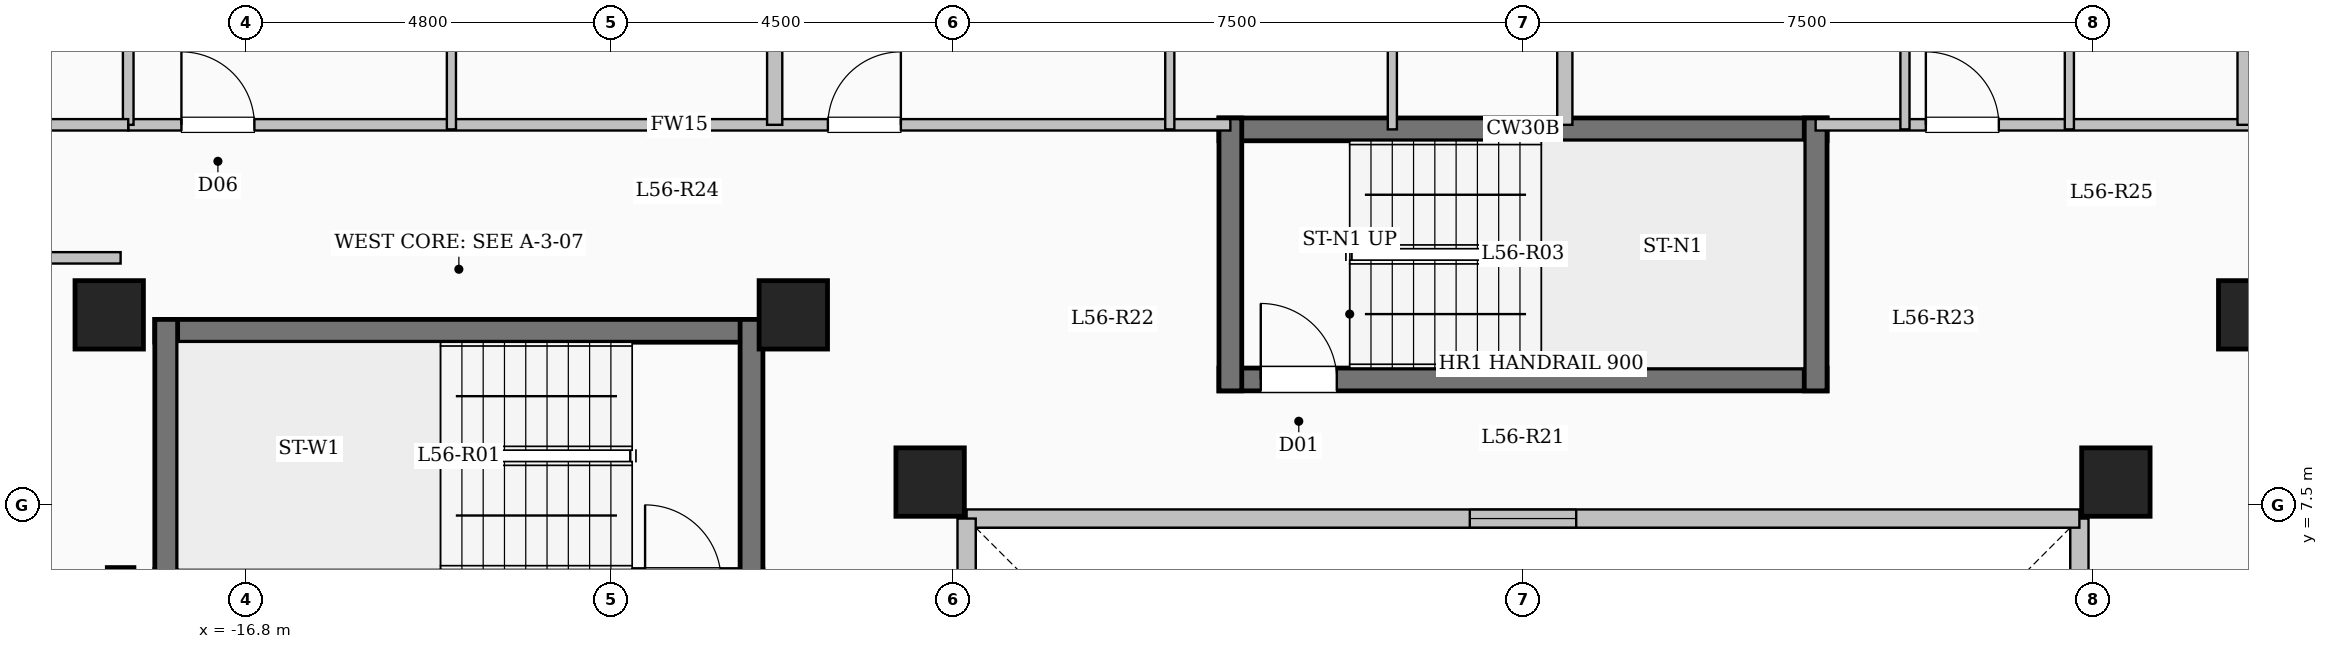
"""IFC4 building model, lengths in metres.
Left out: names, types, materials, properties, quantities, classifications, styles, units other than length and angle.
Written with IfcOpenShell. Run it as: python <this file> out.ifc"""

import sys

from ifc_helpers import new_model, si_unit, direction, frame, frame_2d, origin, origin_2d, place, context, subcontext, project, spatial, rectangle, extrude, element, fill, save


model = new_model("IFC4")
c1 = context("Model", 3, precision=1e-05, world=origin(), true_north=direction((0.0, 1.0)))
c2 = subcontext(c1, "Body", "Model", "MODEL_VIEW")
j1 = project(units=[si_unit("LENGTHUNIT", "METRE"), si_unit("PLANEANGLEUNIT", "RADIAN")], contexts=[c1])
p1 = place(None, origin())
s1 = spatial("IfcSite", under=j1, at=p1, CompositionType="ELEMENT")
p2 = place(p1, origin())
s2 = spatial("IfcBuilding", under=s1, at=p2, CompositionType="ELEMENT")
p3 = place(p2, frame((0.0, 0.0, 207.0)))
s3 = spatial("IfcBuildingStorey", under=s2, at=p3, CompositionType="ELEMENT", Elevation=207.0)
for number, where, z_axis, x_axis in (
    (1, (-7.8, 7.8, 0.0), (0.0, 0.0, 1.0), (1.0, 0.0, 0.0)),
    (2, (7.8, 7.8, 0.0), (0.0, 0.0, 1.0), (1.0, 0.0, 0.0)),
    (3, (-9.6, 10.0, 0.0), (0.0, 0.0, 1.0), (1.0, 0.0, 0.0)),
    (4, (9.6, 10.0, 0.0), (0.0, 0.0, 1.0), (1.0, 0.0, 0.0)),
    (5, (-18.6, 10.0, 0.0), (0.0, 0.0, 1.0), (1.0, 0.0, 0.0)),
):
    element("IfcColumn", number, at=place(p3, frame(where, z_axis=z_axis, x_axis=x_axis)), inside=s3, PredefinedType="COLUMN", context=c2, shape_type="SweptSolid", body=[
        extrude(rectangle(XDim=0.9, YDim=0.9, at=origin_2d()), origin(), (0.0, 0.0, 1.0), 3.35),
    ])
p4 = place(p3, frame((7.32, -7.32, 0.0), z_axis=(0.0, 0.0, 1.0), x_axis=(0.0, 1.0, 0.0)))
e6 = element("IfcWall", 6, at=p4, inside=s3, PredefinedType="SOLIDWALL", context=c2, shape_type="SweptSolid", body=[
    extrude(rectangle(XDim=14.64, YDim=0.24, at=frame_2d((7.32, 0.0))), origin(), (0.0, 0.0, 1.0), 3.1),
])
p5 = place(p4, frame((6.62, 0.0, 0.95)))
e7 = element("IfcOpeningElement", 7, at=p5, cuts=e6, PredefinedType="OPENING", context=c2, shape_type="SweptSolid", body=[
    extrude(rectangle(XDim=1.4, YDim=1.5, at=frame_2d((0.7, 0.75))), frame((0.0, 0.13, 0.0), z_axis=(0.0, -1.0, 0.0), x_axis=(1.0, 0.0, 0.0)), (0.0, 0.0, 1.0), 0.26),
])
p6 = place(p3, frame((7.32, 7.32, 0.0), z_axis=(0.0, 0.0, 1.0), x_axis=(-1.0, 0.0, 0.0)))
e8 = element("IfcWall", 8, at=p6, inside=s3, PredefinedType="SOLIDWALL", context=c2, shape_type="SweptSolid", body=[
    extrude(rectangle(XDim=14.64, YDim=0.24, at=frame_2d((7.32, 0.0))), origin(), (0.0, 0.0, 1.0), 3.1),
])
p7 = place(p6, frame((6.62, 0.0, 0.95)))
e9 = element("IfcOpeningElement", 9, at=p7, cuts=e8, PredefinedType="OPENING", context=c2, shape_type="SweptSolid", body=[
    extrude(rectangle(XDim=1.4, YDim=1.5, at=frame_2d((0.7, 0.75))), frame((0.0, 0.13, 0.0), z_axis=(0.0, -1.0, 0.0), x_axis=(1.0, 0.0, 0.0)), (0.0, 0.0, 1.0), 0.26),
])
p8 = place(p3, frame((-7.32, 7.32, 0.0), z_axis=(0.0, 0.0, 1.0), x_axis=(0.0, -1.0, 0.0)))
e10 = element("IfcWall", 10, at=p8, inside=s3, PredefinedType="SOLIDWALL", context=c2, shape_type="SweptSolid", body=[
    extrude(rectangle(XDim=14.64, YDim=0.24, at=frame_2d((7.32, 0.0))), origin(), (0.0, 0.0, 1.0), 3.1),
])
p9 = place(p8, frame((6.62, 0.0, 0.95)))
e11 = element("IfcOpeningElement", 11, at=p9, cuts=e10, PredefinedType="OPENING", context=c2, shape_type="SweptSolid", body=[
    extrude(rectangle(XDim=1.4, YDim=1.5, at=frame_2d((0.7, 0.75))), frame((0.0, 0.13, 0.0), z_axis=(0.0, -1.0, 0.0), x_axis=(1.0, 0.0, 0.0)), (0.0, 0.0, 1.0), 0.26),
])
p10 = place(p3, frame((-18.0, 9.79, 0.0), z_axis=(0.0, 0.0, 1.0), x_axis=(1.0, 0.0, 0.0)))
e12 = element("IfcWall", 12, at=p10, inside=s3, PredefinedType="SHEAR", context=c2, shape_type="SweptSolid", body=[
    extrude(rectangle(XDim=8.0, YDim=0.3, at=frame_2d((4.0, 0.0))), origin(), (0.0, 0.0, 1.0), 3.35),
])
p11 = place(p3, frame((-18.0, 6.5, 0.0), z_axis=(0.0, 0.0, 1.0), x_axis=(1.0, 0.0, 0.0)))
e13 = element("IfcWall", 13, at=p11, inside=s3, PredefinedType="SHEAR", context=c2, shape_type="SweptSolid", body=[
    extrude(rectangle(XDim=8.0, YDim=0.3, at=frame_2d((4.0, 0.0))), origin(), (0.0, 0.0, 1.0), 3.35),
])
p12 = place(p11, frame((6.45, 0.0, 0.0)))
e14 = element("IfcOpeningElement", 14, at=p12, cuts=e13, PredefinedType="OPENING", context=c2, shape_type="SweptSolid", body=[
    extrude(rectangle(XDim=1.0, YDim=2.15, at=frame_2d((0.5, 1.075))), frame((0.0, 0.16, 0.0), z_axis=(0.0, -1.0, 0.0), x_axis=(1.0, 0.0, 0.0)), (0.0, 0.0, 1.0), 0.32),
])
for number, where, z_axis, x_axis in (
    (15, (-17.85, 6.35, 0.0), (0.0, 0.0, 1.0), (0.0, 1.0, 0.0)),
    (16, (-10.15, 6.35, 0.0), (0.0, 0.0, 1.0), (0.0, 1.0, 0.0)),
):
    element("IfcWall", number, at=place(p3, frame(where, z_axis=z_axis, x_axis=x_axis)), inside=s3, PredefinedType="SHEAR", context=c2, shape_type="SweptSolid", body=[
        extrude(rectangle(XDim=3.59, YDim=0.3, at=frame_2d((1.795, 0.0))), origin(), (0.0, 0.0, 1.0), 3.35),
    ])
p13 = place(p3, frame((-4.0, 12.44, 0.0), z_axis=(0.0, 0.0, 1.0), x_axis=(1.0, 0.0, 0.0)))
e17 = element("IfcWall", 17, at=p13, inside=s3, PredefinedType="SHEAR", context=c2, shape_type="SweptSolid", body=[
    extrude(rectangle(XDim=8.0, YDim=0.3, at=frame_2d((4.0, 0.0))), origin(), (0.0, 0.0, 1.0), 3.35),
])
p14 = place(p3, frame((-4.0, 9.15, 0.0), z_axis=(0.0, 0.0, 1.0), x_axis=(1.0, 0.0, 0.0)))
e18 = element("IfcWall", 18, at=p14, inside=s3, PredefinedType="SHEAR", context=c2, shape_type="SweptSolid", body=[
    extrude(rectangle(XDim=8.0, YDim=0.3, at=frame_2d((4.0, 0.0))), origin(), (0.0, 0.0, 1.0), 3.35),
])
p15 = place(p14, frame((0.55, 0.0, 0.0)))
e19 = element("IfcOpeningElement", 19, at=p15, cuts=e18, PredefinedType="OPENING", context=c2, shape_type="SweptSolid", body=[
    extrude(rectangle(XDim=1.0, YDim=2.15, at=frame_2d((0.5, 1.075))), frame((0.0, 0.16, 0.0), z_axis=(0.0, -1.0, 0.0), x_axis=(1.0, 0.0, 0.0)), (0.0, 0.0, 1.0), 0.32),
])
for number, where, z_axis, x_axis in (
    (20, (-3.85, 9.0, 0.0), (0.0, 0.0, 1.0), (0.0, 1.0, 0.0)),
    (21, (3.85, 9.0, 0.0), (0.0, 0.0, 1.0), (0.0, 1.0, 0.0)),
):
    element("IfcWall", number, at=place(p3, frame(where, z_axis=z_axis, x_axis=x_axis)), inside=s3, PredefinedType="SHEAR", context=c2, shape_type="SweptSolid", body=[
        extrude(rectangle(XDim=3.59, YDim=0.3, at=frame_2d((1.795, 0.0))), origin(), (0.0, 0.0, 1.0), 3.35),
    ])
p16 = place(p3, frame((-18.45, -7.375, 0.0), z_axis=(0.0, 0.0, 1.0), x_axis=(0.0, 1.0, 0.0)))
e22 = element("IfcWall", 22, at=p16, inside=s3, PredefinedType="SHEAR", context=c2, shape_type="SweptSolid", body=[
    extrude(rectangle(XDim=14.05, YDim=0.35, at=frame_2d((7.025, 0.0))), origin(), (0.0, 0.0, 1.0), 3.35),
])
p17 = place(p3, frame((-18.35, 12.5, 0.0), z_axis=(0.0, 0.0, 1.0), x_axis=(1.0, 0.0, 0.0)))
e23 = element("IfcWall", 23, at=p17, inside=s3, PredefinedType="PARTITIONING", context=c2, shape_type="SweptSolid", body=[
    extrude(rectangle(XDim=14.5, YDim=0.15, at=frame_2d((7.25, 0.0))), origin(), (0.0, 0.0, 1.0), 3.1),
])
p18 = place(p17, frame((0.7, 0.0, 0.0)))
e24 = element("IfcOpeningElement", 24, at=p18, cuts=e23, PredefinedType="OPENING", context=c2, shape_type="SweptSolid", body=[
    extrude(rectangle(XDim=0.96, YDim=2.15, at=frame_2d((0.48, 1.075))), frame((0.0, 0.085, 0.0), z_axis=(0.0, -1.0, 0.0), x_axis=(1.0, 0.0, 0.0)), (0.0, 0.0, 1.0), 0.17),
])
p19 = place(p17, frame((9.205, 0.0, 0.0)))
e25 = element("IfcOpeningElement", 25, at=p19, cuts=e23, PredefinedType="OPENING", context=c2, shape_type="SweptSolid", body=[
    extrude(rectangle(XDim=0.96, YDim=2.15, at=frame_2d((0.48, 1.075))), frame((0.0, 0.085, 0.0), z_axis=(0.0, -1.0, 0.0), x_axis=(1.0, 0.0, 0.0)), (0.0, 0.0, 1.0), 0.17),
])
p20 = place(p3, frame((3.85, 12.5, 0.0), z_axis=(0.0, 0.0, 1.0), x_axis=(1.0, 0.0, 0.0)))
e26 = element("IfcWall", 26, at=p20, inside=s3, PredefinedType="PARTITIONING", context=c2, shape_type="SweptSolid", body=[
    extrude(rectangle(XDim=14.5, YDim=0.15, at=frame_2d((7.25, 0.0))), origin(), (0.0, 0.0, 1.0), 3.1),
])
p21 = place(p20, frame((1.45, 0.0, 0.0)))
e27 = element("IfcOpeningElement", 27, at=p21, cuts=e26, PredefinedType="OPENING", context=c2, shape_type="SweptSolid", body=[
    extrude(rectangle(XDim=0.96, YDim=2.15, at=frame_2d((0.48, 1.075))), frame((0.0, 0.085, 0.0), z_axis=(0.0, -1.0, 0.0), x_axis=(1.0, 0.0, 0.0)), (0.0, 0.0, 1.0), 0.17),
])
p22 = place(p20, frame((6.35, 0.0, 0.0)))
e28 = element("IfcOpeningElement", 28, at=p22, cuts=e26, PredefinedType="OPENING", context=c2, shape_type="SweptSolid", body=[
    extrude(rectangle(XDim=0.96, YDim=2.15, at=frame_2d((0.48, 1.075))), frame((0.0, 0.085, 0.0), z_axis=(0.0, -1.0, 0.0), x_axis=(1.0, 0.0, 0.0)), (0.0, 0.0, 1.0), 0.17),
])
p23 = place(p3, frame((0.55, 12.5, 0.0), z_axis=(0.0, 0.0, 1.0), x_axis=(0.0, 1.0, 0.0)))
e29 = element("IfcWall", 29, at=p23, inside=s3, PredefinedType="SOLIDWALL", context=c2, shape_type="SweptSolid", body=[
    extrude(rectangle(XDim=9.88, YDim=0.2, at=frame_2d((4.94, 0.0))), origin(), (0.0, 0.0, 1.0), 3.1),
])
p24 = place(p3, frame((-9.845, 12.5, 0.0), z_axis=(0.0, 0.0, 1.0), x_axis=(0.0, 1.0, 0.0)))
e30 = element("IfcWall", 30, at=p24, inside=s3, PredefinedType="SOLIDWALL", context=c2, shape_type="SweptSolid", body=[
    extrude(rectangle(XDim=8.685, YDim=0.2, at=frame_2d((4.343, 0.0))), origin(), (0.0, 0.0, 1.0), 3.1),
])
p25 = place(p3, frame((-14.098, 12.44, 0.0), z_axis=(0.0, 0.0, 1.0), x_axis=(0.0, 1.0, 0.0)))
e31 = element("IfcWall", 31, at=p25, inside=s3, PredefinedType="PARTITIONING", context=c2, shape_type="SweptSolid", body=[
    extrude(rectangle(XDim=3.21, YDim=0.12, at=frame_2d((1.605, 0.0))), origin(), (0.0, 0.0, 1.0), 3.1),
])
p26 = place(p25, frame((1.195, 0.0, 0.0)))
e32 = element("IfcOpeningElement", 32, at=p26, cuts=e31, PredefinedType="OPENING", context=c2, shape_type="SweptSolid", body=[
    extrude(rectangle(XDim=0.88, YDim=2.1, at=frame_2d((0.44, 1.05))), frame((0.0, 0.07, 0.0), z_axis=(0.0, -1.0, 0.0), x_axis=(1.0, 0.0, 0.0)), (0.0, 0.0, 1.0), 0.14),
])
p27 = place(p3, frame((-4.647, 12.44, 0.0), z_axis=(0.0, 0.0, 1.0), x_axis=(0.0, 1.0, 0.0)))
e33 = element("IfcWall", 33, at=p27, inside=s3, PredefinedType="PARTITIONING", context=c2, shape_type="SweptSolid", body=[
    extrude(rectangle(XDim=9.94, YDim=0.12, at=frame_2d((4.97, 0.0))), origin(), (0.0, 0.0, 1.0), 3.1),
])
p28 = place(p27, frame((3.075, 0.0, 0.0)))
e34 = element("IfcOpeningElement", 34, at=p28, cuts=e33, PredefinedType="OPENING", context=c2, shape_type="SweptSolid", body=[
    extrude(rectangle(XDim=1.08, YDim=2.15, at=frame_2d((0.54, 1.075))), frame((0.0, 0.07, 0.0), z_axis=(0.0, -1.0, 0.0), x_axis=(1.0, 0.0, 0.0)), (0.0, 0.0, 1.0), 0.14),
])
p29 = place(p3, frame((-1.719, 12.44, 0.0), z_axis=(0.0, 0.0, 1.0), x_axis=(0.0, 1.0, 0.0)))
e35 = element("IfcWall", 35, at=p29, inside=s3, PredefinedType="PARTITIONING", context=c2, shape_type="SweptSolid", body=[
    extrude(rectangle(XDim=2.79, YDim=0.12, at=frame_2d((1.395, 0.0))), origin(), (0.0, 0.0, 1.0), 3.1),
])
p30 = place(p3, frame((9.5, 12.5, 0.0), z_axis=(0.0, 0.0, 1.0), x_axis=(0.0, 1.0, 0.0)))
e36 = element("IfcWall", 36, at=p30, inside=s3, PredefinedType="SOLIDWALL", context=c2, shape_type="SweptSolid", body=[
    extrude(rectangle(XDim=8.77, YDim=0.2, at=frame_2d((4.385, 0.0))), origin(), (0.0, 0.0, 1.0), 3.1),
])
p31 = place(p3, frame((5.025, 12.44, 0.0), z_axis=(0.0, 0.0, 1.0), x_axis=(0.0, 1.0, 0.0)))
e37 = element("IfcWall", 37, at=p31, inside=s3, PredefinedType="PARTITIONING", context=c2, shape_type="SweptSolid", body=[
    extrude(rectangle(XDim=9.934, YDim=0.12, at=frame_2d((4.967, 0.0))), origin(), (0.0, 0.0, 1.0), 3.1),
])
p32 = place(p31, frame((3.245, 0.0, 0.0)))
e38 = element("IfcOpeningElement", 38, at=p32, cuts=e37, PredefinedType="OPENING", context=c2, shape_type="SweptSolid", body=[
    extrude(rectangle(XDim=1.08, YDim=2.15, at=frame_2d((0.54, 1.075))), frame((0.0, 0.07, 0.0), z_axis=(0.0, -1.0, 0.0), x_axis=(1.0, 0.0, 0.0)), (0.0, 0.0, 1.0), 0.14),
])
p33 = place(p3, frame((7.188, 12.44, 0.0), z_axis=(0.0, 0.0, 1.0), x_axis=(0.0, 1.0, 0.0)))
e39 = element("IfcWall", 39, at=p33, inside=s3, PredefinedType="PARTITIONING", context=c2, shape_type="SweptSolid", body=[
    extrude(rectangle(XDim=2.96, YDim=0.12, at=frame_2d((1.48, 0.0))), origin(), (0.0, 0.0, 1.0), 2.585),
])
p34 = place(p3, frame((-23.58, 10.75, 0.0), z_axis=(0.0, 0.0, 1.0), x_axis=(1.0, 0.0, 0.0)))
e40 = element("IfcWall", 40, at=p34, inside=s3, PredefinedType="PARTITIONING", context=c2, shape_type="SweptSolid", body=[
    extrude(rectangle(XDim=5.13, YDim=0.15, at=frame_2d((2.565, 0.0))), origin(), (0.0, 0.0, 1.0), 3.1),
])
p35 = place(p3, frame((-18.35, 12.5, 0.0), z_axis=(0.0, 0.0, 1.0), x_axis=(0.0, 1.0, 0.0)))
e41 = element("IfcWall", 41, at=p35, inside=s3, PredefinedType="PARTITIONING", context=c2, shape_type="SweptSolid", body=[
    extrude(rectangle(XDim=4.75, YDim=0.14, at=frame_2d((2.375, 0.0))), origin(), (0.0, 0.0, 1.0), 3.1),
])
p36 = place(p3, frame((-23.58, 12.5, 0.0), z_axis=(0.0, 0.0, 1.0), x_axis=(1.0, 0.0, 0.0)))
e42 = element("IfcWall", 42, at=p36, inside=s3, PredefinedType="PARTITIONING", context=c2, shape_type="SweptSolid", body=[
    extrude(rectangle(XDim=5.23, YDim=0.15, at=frame_2d((2.615, 0.0))), origin(), (0.0, 0.0, 1.0), 3.1),
])
p37 = place(p36, frame((2.14, 0.0, 0.0)))
e43 = element("IfcOpeningElement", 43, at=p37, cuts=e42, PredefinedType="OPENING", context=c2, shape_type="SweptSolid", body=[
    extrude(rectangle(XDim=0.95, YDim=2.15, at=frame_2d((0.475, 1.075))), frame((0.0, 0.085, 0.0), z_axis=(0.0, -1.0, 0.0), x_axis=(1.0, 0.0, 0.0)), (0.0, 0.0, 1.0), 0.17),
])
p38 = place(p7, origin())
e44 = element("IfcWindow", 44, at=p38, inside=s3, PartitioningType="SINGLE_PANEL", PredefinedType="WINDOW", context=c2, shape_type="SweptSolid", body=[
    extrude(rectangle(XDim=1.4, YDim=1.5, at=frame_2d((0.7, 0.75))), frame((0.0, 0.03, 0.0), z_axis=(0.0, -1.0, 0.0), x_axis=(1.0, 0.0, 0.0)), (0.0, 0.0, 1.0), 0.06),
])
fill(e9, e44)
p39 = place(p15, origin())
e45 = element("IfcDoor", 45, at=p39, inside=s3, OperationType="SINGLE_SWING_LEFT", PredefinedType="DOOR", context=c2, shape_type="SweptSolid", body=[
    extrude(rectangle(XDim=1.0, YDim=2.15, at=frame_2d((0.5, 1.075))), frame((0.0, 0.025, 0.0), z_axis=(0.0, -1.0, 0.0), x_axis=(1.0, 0.0, 0.0)), (0.0, 0.0, 1.0), 0.05),
])
fill(e19, e45)
p40 = place(p18, origin())
e46 = element("IfcDoor", 46, at=p40, inside=s3, OperationType="SINGLE_SWING_LEFT", PredefinedType="DOOR", context=c2, shape_type="SweptSolid", body=[
    extrude(rectangle(XDim=0.96, YDim=2.15, at=frame_2d((0.48, 1.075))), frame((0.0, 0.025, 0.0), z_axis=(0.0, -1.0, 0.0), x_axis=(1.0, 0.0, 0.0)), (0.0, 0.0, 1.0), 0.05),
])
fill(e24, e46)
p41 = place(p19, origin())
e47 = element("IfcDoor", 47, at=p41, inside=s3, OperationType="SINGLE_SWING_RIGHT", PredefinedType="DOOR", context=c2, shape_type="SweptSolid", body=[
    extrude(rectangle(XDim=0.96, YDim=2.15, at=frame_2d((0.48, 1.075))), frame((0.0, 0.025, 0.0), z_axis=(0.0, -1.0, 0.0), x_axis=(1.0, 0.0, 0.0)), (0.0, 0.0, 1.0), 0.05),
])
fill(e25, e47)
p42 = place(p21, origin())
e48 = element("IfcDoor", 48, at=p42, inside=s3, OperationType="SINGLE_SWING_LEFT", PredefinedType="DOOR", context=c2, shape_type="SweptSolid", body=[
    extrude(rectangle(XDim=0.96, YDim=2.15, at=frame_2d((0.48, 1.075))), frame((0.0, 0.025, 0.0), z_axis=(0.0, -1.0, 0.0), x_axis=(1.0, 0.0, 0.0)), (0.0, 0.0, 1.0), 0.05),
])
fill(e27, e48)
save(model, sys.argv[1])
